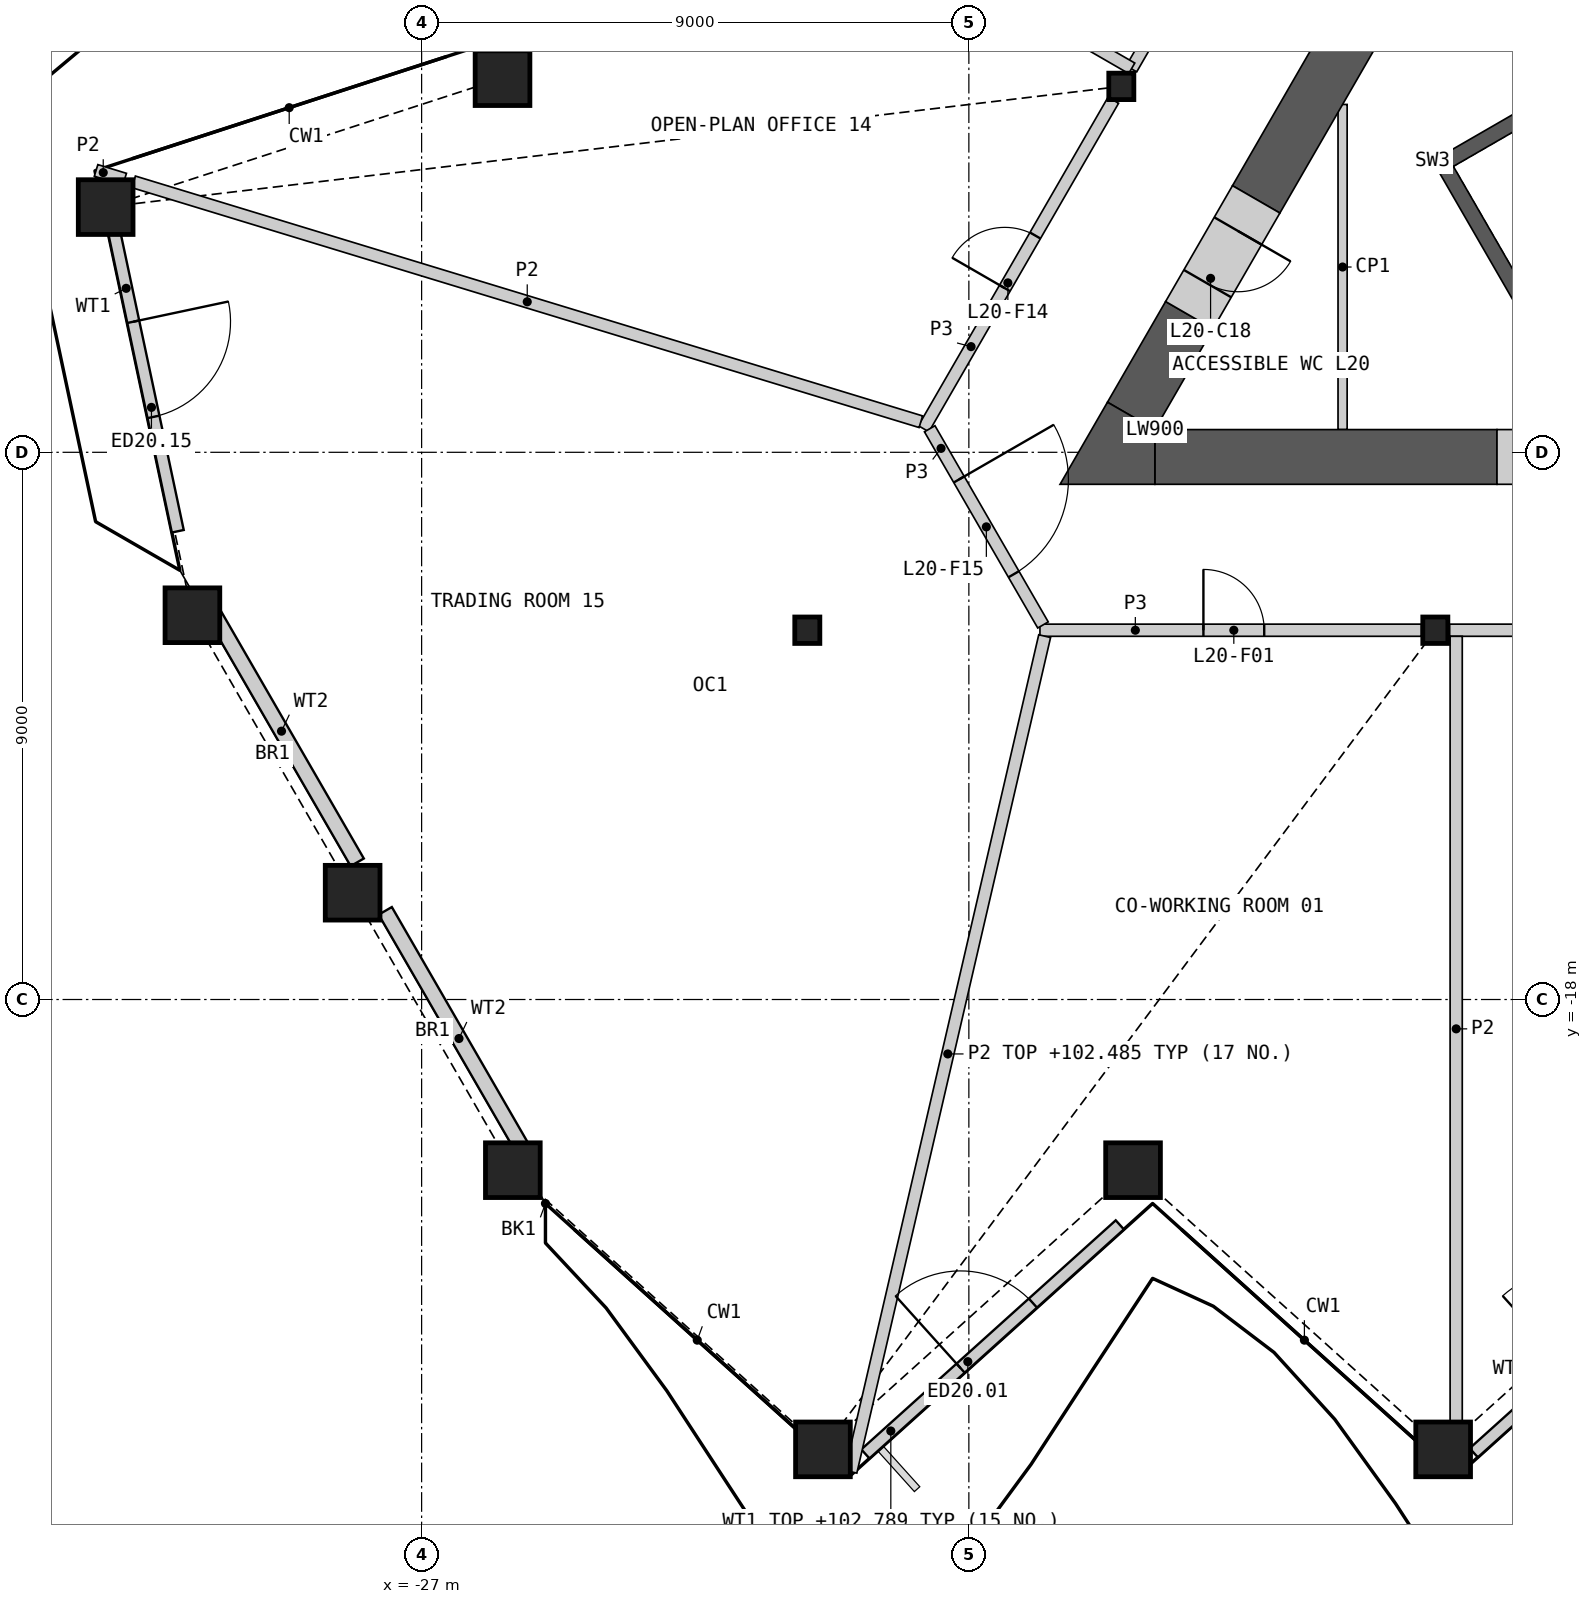
"""IFC4 building model, lengths in metres.
Left out: names, types, materials, properties, quantities, classifications, styles, units other than length and angle.
Written with IfcOpenShell. Run it as: python <this file> out.ifc"""

import sys

from ifc_helpers import new_model, si_unit, direction, frame, frame_2d, origin, origin_2d, place, context, subcontext, project, spatial, polyline, rectangle, hollow_rectangle, i_section, outline, extrude, element, fill, save


model = new_model("IFC4")
c1 = context("Model", 3, precision=1e-05, world=origin(), true_north=direction((0.0, 1.0)))
c2 = subcontext(c1, "Body", "Model", "MODEL_VIEW")
j1 = project(units=[si_unit("LENGTHUNIT", "METRE"), si_unit("PLANEANGLEUNIT", "RADIAN")], contexts=[c1])
p1 = place(None, origin())
s1 = spatial("IfcSite", under=j1, at=p1, CompositionType="ELEMENT")
p2 = place(p1, origin())
s2 = spatial("IfcBuilding", under=s1, at=p2, CompositionType="ELEMENT")
p3 = place(p2, frame((0.0, 0.0, 99.6)))
s3 = spatial("IfcBuildingStorey", under=s2, at=p3, CompositionType="ELEMENT", Elevation=99.6)
for number, where, z_axis, x_axis in (
    (1, (-25.5, -20.807, 0.0), (0.0, 0.0, 1.0), (1.0, 0.0, 0.0)),
    (2, (-20.4, -25.399, 0.0), (0.0, 0.0, 1.0), (1.0, 0.0, 0.0)),
    (3, (-15.3, -20.807, 0.0), (0.0, 0.0, 1.0), (1.0, 0.0, 0.0)),
    (4, (-10.2, -25.399, 0.0), (0.0, 0.0, 1.0), (1.0, 0.0, 0.0)),
    (5, (-25.669, -2.846, 0.0), (0.0, 0.0, 1.0), (1.0, 0.0, 0.0)),
    (6, (-32.196, -4.967, 0.0), (0.0, 0.0, 1.0), (1.0, 0.0, 0.0)),
    (7, (-30.769, -11.68, 0.0), (0.0, 0.0, 1.0), (1.0, 0.0, 0.0)),
    (8, (-28.135, -16.243, 0.0), (0.0, 0.0, 1.0), (1.0, 0.0, 0.0)),
):
    element("IfcColumn", number, at=place(p3, frame(where, z_axis=z_axis, x_axis=x_axis)), inside=s3, PredefinedType="COLUMN", context=c2, shape_type="SweptSolid", body=[
        extrude(hollow_rectangle(XDim=0.9, YDim=0.9, WallThickness=0.06, at=origin_2d()), origin(), (0.0, 0.0, 1.0), 4.2),
    ])
for number, where, z_axis, x_axis in (
    (9, (-15.493, -2.982, 0.0), (0.0, 0.0, 1.0), (1.0, 0.0, 0.0)),
    (10, (-20.657, -11.926, 0.0), (0.0, 0.0, 1.0), (1.0, 0.0, 0.0)),
    (11, (-10.328, -11.926, 0.0), (0.0, 0.0, 1.0), (1.0, 0.0, 0.0)),
):
    element("IfcColumn", number, at=place(p3, frame(where, z_axis=z_axis, x_axis=x_axis)), inside=s3, PredefinedType="COLUMN", context=c2, shape_type="SweptSolid", body=[
        extrude(i_section(OverallWidth=0.412, OverallDepth=0.435, WebThickness=0.036, FlangeThickness=0.057, at=origin_2d()), origin(), (0.0, 0.0, 1.0), 4.2),
    ])
p4 = place(p3, frame((-19.702, -25.474, 0.0), z_axis=(0.0, 0.0, 1.0), x_axis=(0.743145362679, 0.669130009736, 0.0)))
e12 = element("IfcWall", 12, at=p4, inside=s3, PredefinedType="SOLIDWALL", context=c2, shape_type="SweptSolid", body=[
    extrude(rectangle(XDim=5.631, YDim=0.2, at=frame_2d((2.815, 0.0))), origin(), (0.0, 0.0, 1.0), 3.189),
])
p5 = place(p4, frame((2.107, 0.0, 0.0)))
e13 = element("IfcOpeningElement", 13, at=p5, cuts=e12, PredefinedType="OPENING", context=c2, shape_type="SweptSolid", body=[
    extrude(rectangle(XDim=1.6, YDim=2.4, at=frame_2d((0.8, 1.2))), frame((0.0, 0.11, 0.0), z_axis=(0.0, -1.0, 0.0), x_axis=(1.0, 0.0, 0.0)), (0.0, 0.0, 1.0), 0.22),
])
p6 = place(p3, frame((-9.696, -25.456, 0.0), z_axis=(0.0, 0.0, 1.0), x_axis=(0.743151138555, 0.66912359491, 0.0)))
e14 = element("IfcWall", 14, at=p6, inside=s3, PredefinedType="SOLIDWALL", context=c2, shape_type="SweptSolid", body=[
    extrude(rectangle(XDim=5.603, YDim=0.2, at=frame_2d((2.802, 0.0))), origin(), (0.0, 0.0, 1.0), 3.189),
])
p7 = place(p6, frame((2.08, 0.0, 0.0)))
e15 = element("IfcOpeningElement", 15, at=p7, cuts=e14, PredefinedType="OPENING", context=c2, shape_type="SweptSolid", body=[
    extrude(rectangle(XDim=1.6, YDim=2.4, at=frame_2d((0.8, 1.2))), frame((0.0, 0.11, 0.0), z_axis=(0.0, -1.0, 0.0), x_axis=(1.0, 0.0, 0.0)), (0.0, 0.0, 1.0), 0.22),
])
p8 = place(p3, frame((-32.142, -4.971, 0.0), z_axis=(0.0, 0.0, 1.0), x_axis=(0.207903253291, -0.978149394148, 0.0)))
e16 = element("IfcWall", 16, at=p8, inside=s3, PredefinedType="SOLIDWALL", context=c2, shape_type="SweptSolid", body=[
    extrude(rectangle(XDim=5.446, YDim=0.2, at=frame_2d((2.723, 0.0))), origin(), (0.0, 0.0, 1.0), 3.189),
])
p9 = place(p8, frame((1.923, 0.0, 0.0)))
e17 = element("IfcOpeningElement", 17, at=p9, cuts=e16, PredefinedType="OPENING", context=c2, shape_type="SweptSolid", body=[
    extrude(rectangle(XDim=1.6, YDim=2.4, at=frame_2d((0.8, 1.2))), frame((0.0, 0.11, 0.0), z_axis=(0.0, -1.0, 0.0), x_axis=(1.0, 0.0, 0.0)), (0.0, 0.0, 1.0), 0.22),
])
p10 = place(p3, frame((-30.549, -11.43, 0.0), z_axis=(0.0, 0.0, 1.0), x_axis=(0.499992577793, -0.866029688955, 0.0)))
e18 = element("IfcWall", 18, at=p10, inside=s3, PredefinedType="SOLIDWALL", context=c2, shape_type="SweptSolid", body=[
    extrude(rectangle(XDim=4.981, YDim=0.25, at=frame_2d((2.49, 0.0))), origin(), (0.0, 0.0, 1.0), 3.189),
])
p11 = place(p3, frame((-27.598, -16.542, 0.0), z_axis=(0.0, 0.0, 1.0), x_axis=(0.499994084299, -0.866028819189, 0.0)))
e19 = element("IfcWall", 19, at=p11, inside=s3, PredefinedType="SOLIDWALL", context=c2, shape_type="SweptSolid", body=[
    extrude(rectangle(XDim=4.85, YDim=0.25, at=frame_2d((2.425, 0.0))), origin(), (0.0, 0.0, 1.0), 3.189),
])
p12 = place(p3, origin())
e20 = element("IfcWall", 20, at=p12, inside=s3, PredefinedType="SHEAR", context=c2, shape_type="SweptSolid", body=[
    extrude(outline(polyline([(-5.307, -1.281), (-10.374, -4.206), (-10.032, -4.298), (-5.182, -1.498), (-5.307, -1.281)])), origin(), (0.0, 0.0, 1.0), 3.8),
])
p13 = place(p3, origin())
e21 = element("IfcWall", 21, at=p13, inside=s3, PredefinedType="SHEAR", context=c2, shape_type="SweptSolid", body=[
    extrude(outline(polyline([(-10.374, -4.206), (-8.83, -6.881), (-8.738, -6.539), (-10.032, -4.298), (-10.374, -4.206)])), origin(), (0.0, 0.0, 1.0), 3.8),
])
p14 = place(p3, frame((-11.854, -8.626, 0.0), z_axis=(0.0, 0.0, 1.0), x_axis=(0.0, 1.0, 0.0)))
e22 = element("IfcWall", 22, at=p14, inside=s3, PredefinedType="PARTITIONING", context=c2, shape_type="SweptSolid", body=[
    extrude(rectangle(XDim=5.347, YDim=0.15, at=frame_2d((2.674, 0.0))), origin(), (0.0, 0.0, 1.0), 3.8),
])
p15 = place(p3, frame((-14.941, -9.076, 0.0), z_axis=(0.0, 0.0, 1.0), x_axis=(1.0, 0.0, 0.0)))
e23 = element("IfcWall", 23, at=p15, inside=s3, PredefinedType="SHEAR", context=c2, shape_type="SweptSolid", body=[
    extrude(rectangle(XDim=5.627, YDim=0.9, at=frame_2d((2.813, 0.0))), origin(), (0.0, 0.0, 1.0), 3.8),
])
p16 = place(p3, frame((-10.06, 0.728, 0.0), z_axis=(0.0, 0.0, 1.0), x_axis=(-0.500002975332, -0.866023685969, 0.0)))
e24 = element("IfcWall", 24, at=p16, inside=s3, PredefinedType="SHEAR", context=c2, shape_type="SweptSolid", body=[
    extrude(rectangle(XDim=6.429, YDim=0.9, at=frame_2d((3.214, 0.0))), origin(), (0.0, 0.0, 1.0), 3.8),
])
p17 = place(p3, frame((-14.375, -6.745, 0.0), z_axis=(0.0, 0.0, 1.0), x_axis=(-0.499928740635, -0.866066541489, 0.0)))
e25 = element("IfcWall", 25, at=p17, inside=s3, PredefinedType="SHEAR", context=c2, shape_type="SweptSolid", body=[
    extrude(rectangle(XDim=1.912, YDim=0.9, at=frame_2d((0.956, 0.0))), origin(), (0.0, 0.0, 1.0), 3.8),
])
p18 = place(p3, origin())
e26 = element("IfcWall", 26, at=p18, inside=s3, PredefinedType="SHEAR", context=c2, shape_type="SweptSolid", body=[
    extrude(outline(polyline([(-14.941, -8.626), (-14.941, -9.526), (-16.5, -9.526), (-15.721, -8.176), (-14.941, -8.626)])), origin(), (0.0, 0.0, 1.0), 3.8),
])
p19 = place(p3, frame((-13.275, -4.84, 0.0), z_axis=(0.0, 0.0, 1.0), x_axis=(-0.50002983664, -0.866008176907, 0.0)))
e27 = element("IfcWall", 27, at=p19, inside=s3, PredefinedType="SHEAR", context=c2, shape_type="SweptSolid", body=[
    extrude(rectangle(XDim=2.2, YDim=0.9, at=frame_2d((1.1, 0.0))), origin(), (0.0, 0.0, 1.0), 3.8),
])
p20 = place(p19, frame((0.6, 0.0, 0.0)))
e28 = element("IfcOpeningElement", 28, at=p20, cuts=e27, PredefinedType="OPENING", context=c2, shape_type="SweptSolid", body=[
    extrude(rectangle(XDim=1.0, YDim=2.1, at=frame_2d((0.5, 1.05))), frame((0.0, 0.46, 0.0), z_axis=(0.0, -1.0, 0.0), x_axis=(1.0, 0.0, 0.0)), (0.0, 0.0, 1.0), 0.92),
])
p21 = place(p3, frame((-9.314, -9.076, 0.0), z_axis=(0.0, 0.0, 1.0), x_axis=(1.0, 0.0, 0.0)))
e29 = element("IfcWall", 29, at=p21, inside=s3, PredefinedType="SHEAR", context=c2, shape_type="SweptSolid", body=[
    extrude(rectangle(XDim=2.2, YDim=0.9, at=frame_2d((1.1, 0.0))), origin(), (0.0, 0.0, 1.0), 3.8),
])
p22 = place(p21, frame((0.6, 0.0, 0.0)))
e30 = element("IfcOpeningElement", 30, at=p22, cuts=e29, PredefinedType="OPENING", context=c2, shape_type="SweptSolid", body=[
    extrude(rectangle(XDim=1.0, YDim=2.1, at=frame_2d((0.5, 1.05))), frame((0.0, 0.46, 0.0), z_axis=(0.0, -1.0, 0.0), x_axis=(1.0, 0.0, 0.0)), (0.0, 0.0, 1.0), 0.92),
])
p23 = place(p3, frame((-10.095, -11.926, 0.0), z_axis=(0.0, 0.0, 1.0), x_axis=(1.0, 0.0, 0.0)))
e31 = element("IfcWall", 31, at=p23, inside=s3, PredefinedType="PARTITIONING", context=c2, shape_type="SweptSolid", body=[
    extrude(rectangle(XDim=9.868, YDim=0.2, at=frame_2d((4.934, 0.0))), origin(), (0.0, 0.0, 1.0), 3.8),
])
p24 = place(p23, frame((4.484, 0.0, 0.0)))
e32 = element("IfcOpeningElement", 32, at=p24, cuts=e31, PredefinedType="OPENING", context=c2, shape_type="SweptSolid", body=[
    extrude(rectangle(XDim=1.0, YDim=2.1, at=frame_2d((0.5, 1.05))), frame((0.0, 0.11, 0.0), z_axis=(0.0, -1.0, 0.0), x_axis=(1.0, 0.0, 0.0)), (0.0, 0.0, 1.0), 0.22),
])
p25 = place(p3, frame((-15.326, -2.693, 0.0), z_axis=(0.0, 0.0, 1.0), x_axis=(0.500010522431, 0.866019328571, 0.0)))
e33 = element("IfcWall", 33, at=p25, inside=s3, PredefinedType="PARTITIONING", context=c2, shape_type="SweptSolid", body=[
    extrude(rectangle(XDim=9.733, YDim=0.2, at=frame_2d((4.866, 0.0))), origin(), (0.0, 0.0, 1.0), 3.8),
])
p26 = place(p25, frame((3.966, 0.0, 0.0)))
e34 = element("IfcOpeningElement", 34, at=p26, cuts=e33, PredefinedType="OPENING", context=c2, shape_type="SweptSolid", body=[
    extrude(rectangle(XDim=1.8, YDim=2.1, at=frame_2d((0.9, 1.05))), frame((0.0, 0.11, 0.0), z_axis=(0.0, -1.0, 0.0), x_axis=(1.0, 0.0, 0.0)), (0.0, 0.0, 1.0), 0.22),
])
p27 = place(p3, frame((-16.831, -11.926, 0.0), z_axis=(0.0, 0.0, 1.0), x_axis=(1.0, 0.0, 0.0)))
e35 = element("IfcWall", 35, at=p27, inside=s3, PredefinedType="PARTITIONING", context=c2, shape_type="SweptSolid", body=[
    extrude(rectangle(XDim=6.275, YDim=0.2, at=frame_2d((3.137, 0.0))), origin(), (0.0, 0.0, 1.0), 3.8),
])
p28 = place(p27, frame((2.688, 0.0, 0.0)))
e36 = element("IfcOpeningElement", 36, at=p28, cuts=e35, PredefinedType="OPENING", context=c2, shape_type="SweptSolid", body=[
    extrude(rectangle(XDim=1.0, YDim=2.1, at=frame_2d((0.5, 1.05))), frame((0.0, 0.11, 0.0), z_axis=(0.0, -1.0, 0.0), x_axis=(1.0, 0.0, 0.0)), (0.0, 0.0, 1.0), 0.22),
])
p29 = place(p3, frame((-18.744, -8.613, 0.0), z_axis=(0.0, 0.0, 1.0), x_axis=(0.499997920671, 0.866026604282, 0.0)))
e37 = element("IfcWall", 37, at=p29, inside=s3, PredefinedType="PARTITIONING", context=c2, shape_type="SweptSolid", body=[
    extrude(rectangle(XDim=6.24, YDim=0.2, at=frame_2d((3.12, 0.0))), origin(), (0.0, 0.0, 1.0), 3.8),
])
p30 = place(p29, frame((2.67, 0.0, 0.0)))
e38 = element("IfcOpeningElement", 38, at=p30, cuts=e37, PredefinedType="OPENING", context=c2, shape_type="SweptSolid", body=[
    extrude(rectangle(XDim=1.0, YDim=2.1, at=frame_2d((0.5, 1.05))), frame((0.0, 0.11, 0.0), z_axis=(0.0, -1.0, 0.0), x_axis=(1.0, 0.0, 0.0)), (0.0, 0.0, 1.0), 0.22),
])
p31 = place(p3, frame((-18.644, -8.613, 0.0), z_axis=(0.0, 0.0, 1.0), x_axis=(0.499958791762, -0.866049194065, 0.0)))
e39 = element("IfcWall", 39, at=p31, inside=s3, PredefinedType="PARTITIONING", context=c2, shape_type="SweptSolid", body=[
    extrude(rectangle(XDim=3.726, YDim=0.2, at=frame_2d((1.863, 0.0))), origin(), (0.0, 0.0, 1.0), 3.8),
])
p32 = place(p31, frame((0.963, 0.0, 0.0)))
e40 = element("IfcOpeningElement", 40, at=p32, cuts=e39, PredefinedType="OPENING", context=c2, shape_type="SweptSolid", body=[
    extrude(rectangle(XDim=1.8, YDim=2.1, at=frame_2d((0.9, 1.05))), frame((0.0, 0.11, 0.0), z_axis=(0.0, -1.0, 0.0), x_axis=(1.0, 0.0, 0.0)), (0.0, 0.0, 1.0), 0.22),
])
p33 = place(p3, frame((-19.94, -25.767, 0.0), z_axis=(0.0, 0.0, 1.0), x_axis=(0.225854066841, 0.974161147086, 0.0)))
e41 = element("IfcWall", 41, at=p33, inside=s3, PredefinedType="PARTITIONING", context=c2, shape_type="SweptSolid", body=[
    extrude(rectangle(XDim=14.108, YDim=0.2, at=frame_2d((7.054, 0.0))), origin(), (0.0, 0.0, 1.0), 2.885),
])
p34 = place(p3, frame((-31.736, -4.552, 0.0), z_axis=(0.0, 0.0, 1.0), x_axis=(0.956574643239, -0.291487481569, 0.0)))
e42 = element("IfcWall", 42, at=p34, inside=s3, PredefinedType="PARTITIONING", context=c2, shape_type="SweptSolid", body=[
    extrude(rectangle(XDim=13.534, YDim=0.2, at=frame_2d((6.767, 0.0))), origin(), (0.0, 0.0, 1.0), 2.885),
])
p35 = place(p3, frame((-26.636, 3.848, 0.0), z_axis=(0.0, 0.0, 1.0), x_axis=(0.866029068465, -0.499993652534, 0.0)))
e43 = element("IfcWall", 43, at=p35, inside=s3, PredefinedType="PARTITIONING", context=c2, shape_type="SweptSolid", body=[
    extrude(rectangle(XDim=13.066, YDim=0.2, at=frame_2d((6.533, 0.0))), origin(), (0.0, 0.0, 1.0), 2.885),
])
p36 = place(p3, frame((-9.985, -24.939, 0.0), z_axis=(0.0, 0.0, 1.0), x_axis=(0.0, 1.0, 0.0)))
e44 = element("IfcWall", 44, at=p36, inside=s3, PredefinedType="PARTITIONING", context=c2, shape_type="SweptSolid", body=[
    extrude(rectangle(XDim=12.913, YDim=0.2, at=frame_2d((6.457, 0.0))), origin(), (0.0, 0.0, 1.0), 2.885),
])
p37 = place(p3, frame((-32.354, -4.364, 0.0), z_axis=(0.0, 0.0, 1.0), x_axis=(0.956697940105, -0.291082550832, 0.0)))
e45 = element("IfcWall", 45, at=p37, inside=s3, PredefinedType="PARTITIONING", context=c2, shape_type="SweptSolid", body=[
    extrude(rectangle(XDim=0.491, YDim=0.2, at=frame_2d((0.246, 0.0))), origin(), (0.0, 0.0, 1.0), 2.885),
])
p38 = place(p5, origin())
e46 = element("IfcDoor", 46, at=p38, inside=s3, OperationType="DOUBLE_DOOR_SINGLE_SWING", PredefinedType="DOOR", context=c2, shape_type="SweptSolid", body=[
    extrude(rectangle(XDim=1.6, YDim=2.4, at=frame_2d((0.8, 1.2))), frame((0.0, 0.025, 0.0), z_axis=(0.0, -1.0, 0.0), x_axis=(1.0, 0.0, 0.0)), (0.0, 0.0, 1.0), 0.05),
])
fill(e13, e46)
p39 = place(p9, origin())
e47 = element("IfcDoor", 47, at=p39, inside=s3, OperationType="DOUBLE_DOOR_SINGLE_SWING", PredefinedType="DOOR", context=c2, shape_type="SweptSolid", body=[
    extrude(rectangle(XDim=1.6, YDim=2.4, at=frame_2d((0.8, 1.2))), frame((0.0, 0.025, 0.0), z_axis=(0.0, -1.0, 0.0), x_axis=(1.0, 0.0, 0.0)), (0.0, 0.0, 1.0), 0.05),
])
fill(e17, e47)
p40 = place(p20, origin())
e48 = element("IfcDoor", 48, at=p40, inside=s3, OperationType="SINGLE_SWING_LEFT", PredefinedType="DOOR", context=c2, shape_type="SweptSolid", body=[
    extrude(rectangle(XDim=1.0, YDim=2.1, at=frame_2d((0.5, 1.05))), frame((0.0, 0.205, 0.0), z_axis=(0.0, -1.0, 0.0), x_axis=(1.0, 0.0, 0.0)), (0.0, 0.0, 1.0), 0.05),
])
fill(e28, e48)
p41 = place(p28, origin())
e49 = element("IfcDoor", 49, at=p41, inside=s3, OperationType="SINGLE_SWING_LEFT", PredefinedType="DOOR", context=c2, shape_type="SweptSolid", body=[
    extrude(rectangle(XDim=1.0, YDim=2.1, at=frame_2d((0.5, 1.05))), frame((0.0, 0.025, 0.0), z_axis=(0.0, -1.0, 0.0), x_axis=(1.0, 0.0, 0.0)), (0.0, 0.0, 1.0), 0.05),
])
fill(e36, e49)
p42 = place(p30, origin())
e50 = element("IfcDoor", 50, at=p42, inside=s3, OperationType="SINGLE_SWING_LEFT", PredefinedType="DOOR", context=c2, shape_type="SweptSolid", body=[
    extrude(rectangle(XDim=1.0, YDim=2.1, at=frame_2d((0.5, 1.05))), frame((0.0, 0.025, 0.0), z_axis=(0.0, -1.0, 0.0), x_axis=(1.0, 0.0, 0.0)), (0.0, 0.0, 1.0), 0.05),
])
fill(e38, e50)
p43 = place(p32, origin())
e51 = element("IfcDoor", 51, at=p43, inside=s3, OperationType="DOUBLE_DOOR_SINGLE_SWING", PredefinedType="DOOR", context=c2, shape_type="SweptSolid", body=[
    extrude(rectangle(XDim=1.8, YDim=2.1, at=frame_2d((0.9, 1.05))), frame((0.0, 0.025, 0.0), z_axis=(0.0, -1.0, 0.0), x_axis=(1.0, 0.0, 0.0)), (0.0, 0.0, 1.0), 0.05),
])
fill(e40, e51)
save(model, sys.argv[1])
